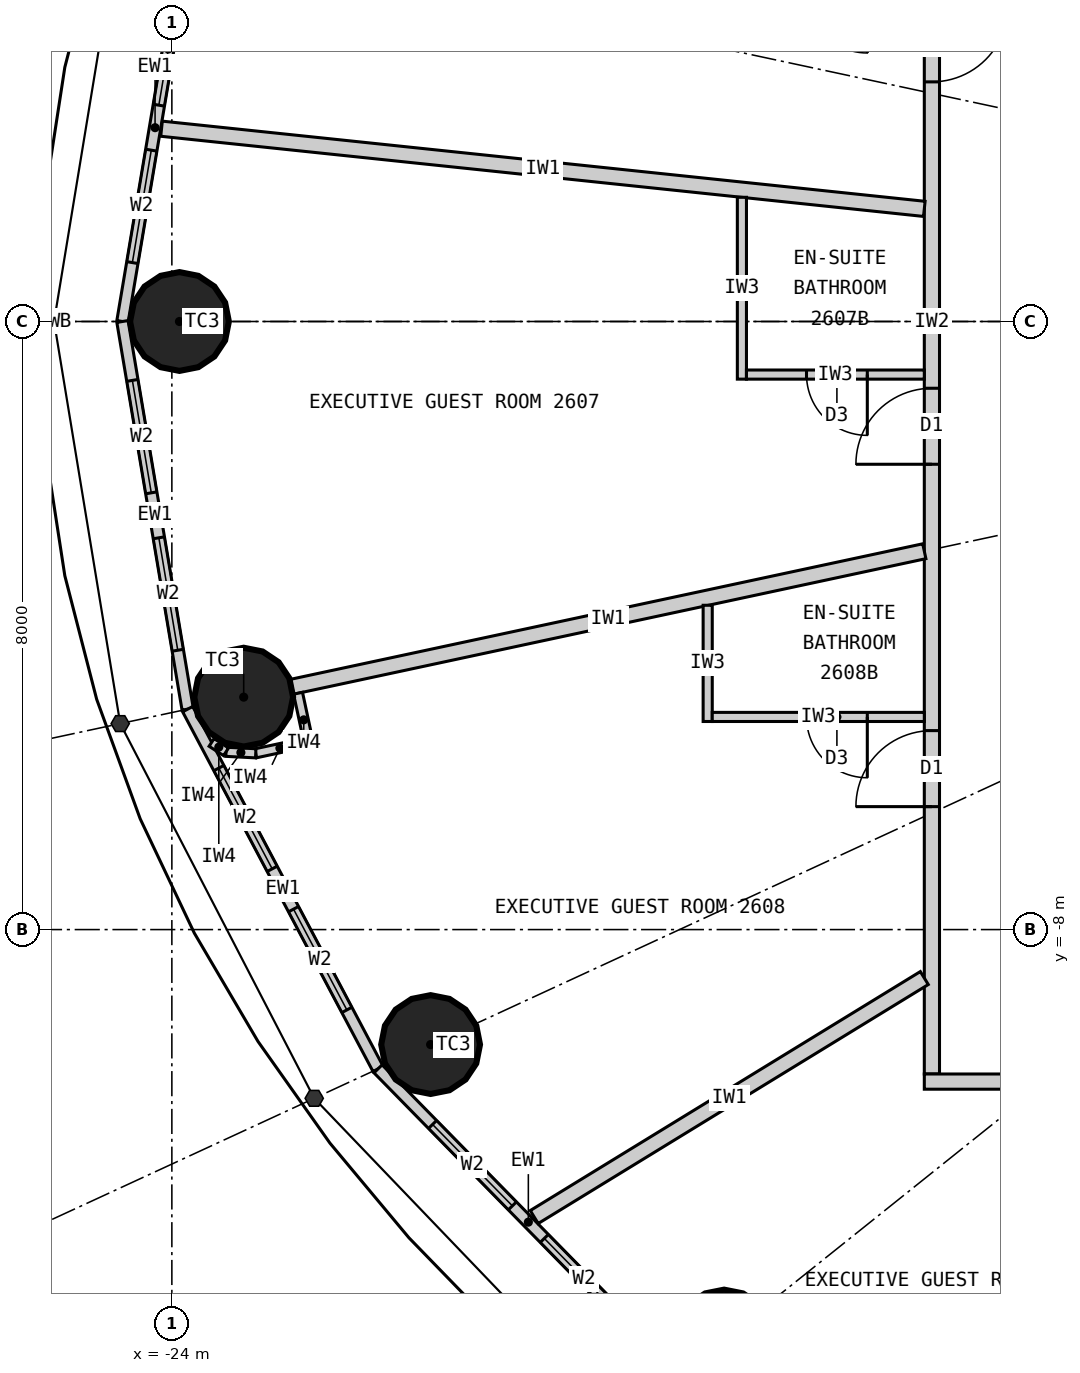
"""IFC4 building model, lengths in metres.
Left out: names, types, materials, properties, quantities, classifications, styles, units other than length and angle.
Written with IfcOpenShell. Run it as: python <this file> out.ifc"""

import sys

from ifc_helpers import new_model, si_unit, direction, frame, frame_2d, origin, origin_2d, place, context, subcontext, project, spatial, rectangle, circle, extrude, element, fill, save


model = new_model("IFC4")
c1 = context("Model", 3, precision=1e-05, world=origin(), true_north=direction((0.0, 1.0)))
c2 = subcontext(c1, "Body", "Model", "MODEL_VIEW")
j1 = project(units=[si_unit("LENGTHUNIT", "METRE"), si_unit("PLANEANGLEUNIT", "RADIAN")], contexts=[c1])
p1 = place(None, origin())
s1 = spatial("IfcSite", under=j1, at=p1, CompositionType="ELEMENT")
p2 = place(p1, origin())
s2 = spatial("IfcBuilding", under=s1, at=p2, CompositionType="ELEMENT")
p3 = place(p2, frame((0.0, 0.0, 105.6)))
s3 = spatial("IfcBuildingStorey", under=s2, at=p3, CompositionType="ELEMENT", Elevation=105.6)
for number, where, z_axis, x_axis in (
    (1, (-23.9, 0.0, 0.0), (0.0, 0.0, 1.0), (1.0, 0.0, 0.0)),
    (2, (-23.055, -4.942, 0.0), (0.0, 0.0, 1.0), (1.0, 0.0, 0.0)),
    (3, (-20.596, -9.513, 0.0), (0.0, 0.0, 1.0), (1.0, 0.0, 0.0)),
    (4, (-16.734, -13.387, 0.0), (0.0, 0.0, 1.0), (1.0, 0.0, 0.0)),
):
    element("IfcColumn", number, at=place(p3, frame(where, z_axis=z_axis, x_axis=x_axis)), inside=s3, PredefinedType="COLUMN", context=c2, shape_type="SweptSolid", body=[
        extrude(circle(Radius=0.65, at=origin_2d()), origin(), (0.0, 0.0, 1.0), 3.3),
    ])
p4 = place(p3, frame((-23.792, 5.1, 0.0), z_axis=(0.0, 0.0, 1.0), x_axis=(-0.165883894218, -0.986145290329, 0.0)))
e5 = element("IfcWall", 5, at=p4, inside=s3, PredefinedType="ELEMENTEDWALL", context=c2, shape_type="SweptSolid", body=[
    extrude(rectangle(XDim=5.172, YDim=0.15, at=frame_2d((2.586, 0.0))), origin(), (0.0, 0.0, 1.0), 3.12),
])
p5 = place(p4, frame((0.786, 0.0, 0.9)))
e6 = element("IfcOpeningElement", 6, at=p5, cuts=e5, PredefinedType="OPENING", context=c2, shape_type="SweptSolid", body=[
    extrude(rectangle(XDim=1.5, YDim=1.9, at=frame_2d((0.75, 0.95))), frame((0.0, 0.085, 0.0), z_axis=(0.0, -1.0, 0.0), x_axis=(1.0, 0.0, 0.0)), (0.0, 0.0, 1.0), 0.17),
])
p6 = place(p4, frame((2.886, 0.0, 0.9)))
e7 = element("IfcOpeningElement", 7, at=p6, cuts=e5, PredefinedType="OPENING", context=c2, shape_type="SweptSolid", body=[
    extrude(rectangle(XDim=1.5, YDim=1.9, at=frame_2d((0.75, 0.95))), frame((0.0, 0.085, 0.0), z_axis=(0.0, -1.0, 0.0), x_axis=(1.0, 0.0, 0.0)), (0.0, 0.0, 1.0), 0.17),
])
p7 = place(p3, frame((-24.65, 0.0, 0.0), z_axis=(0.0, 0.0, 1.0), x_axis=(0.165883894218, -0.986145290329, 0.0)))
e8 = element("IfcWall", 8, at=p7, inside=s3, PredefinedType="ELEMENTEDWALL", context=c2, shape_type="SweptSolid", body=[
    extrude(rectangle(XDim=5.172, YDim=0.15, at=frame_2d((2.586, 0.0))), origin(), (0.0, 0.0, 1.0), 3.12),
])
p8 = place(p7, frame((0.786, 0.0, 0.9)))
e9 = element("IfcOpeningElement", 9, at=p8, cuts=e8, PredefinedType="OPENING", context=c2, shape_type="SweptSolid", body=[
    extrude(rectangle(XDim=1.5, YDim=1.9, at=frame_2d((0.75, 0.95))), frame((0.0, 0.085, 0.0), z_axis=(0.0, -1.0, 0.0), x_axis=(1.0, 0.0, 0.0)), (0.0, 0.0, 1.0), 0.17),
])
p9 = place(p7, frame((2.886, 0.0, 0.9)))
e10 = element("IfcOpeningElement", 10, at=p9, cuts=e8, PredefinedType="OPENING", context=c2, shape_type="SweptSolid", body=[
    extrude(rectangle(XDim=1.5, YDim=1.9, at=frame_2d((0.75, 0.95))), frame((0.0, 0.085, 0.0), z_axis=(0.0, -1.0, 0.0), x_axis=(1.0, 0.0, 0.0)), (0.0, 0.0, 1.0), 0.17),
])
p10 = place(p3, frame((-23.792, -5.1, 0.0), z_axis=(0.0, 0.0, 1.0), x_axis=(0.467814388454, -0.883826735257, 0.0)))
e11 = element("IfcWall", 11, at=p10, inside=s3, PredefinedType="ELEMENTEDWALL", context=c2, shape_type="SweptSolid", body=[
    extrude(rectangle(XDim=5.354, YDim=0.15, at=frame_2d((2.677, 0.0))), origin(), (0.0, 0.0, 1.0), 3.12),
])
p11 = place(p10, frame((0.877, 0.0, 0.9)))
e12 = element("IfcOpeningElement", 12, at=p11, cuts=e11, PredefinedType="OPENING", context=c2, shape_type="SweptSolid", body=[
    extrude(rectangle(XDim=1.5, YDim=1.9, at=frame_2d((0.75, 0.95))), frame((0.0, 0.085, 0.0), z_axis=(0.0, -1.0, 0.0), x_axis=(1.0, 0.0, 0.0)), (0.0, 0.0, 1.0), 0.17),
])
p12 = place(p10, frame((2.977, 0.0, 0.9)))
e13 = element("IfcOpeningElement", 13, at=p12, cuts=e11, PredefinedType="OPENING", context=c2, shape_type="SweptSolid", body=[
    extrude(rectangle(XDim=1.5, YDim=1.9, at=frame_2d((0.75, 0.95))), frame((0.0, 0.085, 0.0), z_axis=(0.0, -1.0, 0.0), x_axis=(1.0, 0.0, 0.0)), (0.0, 0.0, 1.0), 0.17),
])
p13 = place(p3, frame((-21.287, -9.832, 0.0), z_axis=(0.0, 0.0, 1.0), x_axis=(0.700136650834, -0.714008872605, 0.0)))
e14 = element("IfcWall", 14, at=p13, inside=s3, PredefinedType="ELEMENTEDWALL", context=c2, shape_type="SweptSolid", body=[
    extrude(rectangle(XDim=5.649, YDim=0.15, at=frame_2d((2.825, 0.0))), origin(), (0.0, 0.0, 1.0), 3.12),
])
p14 = place(p13, frame((1.025, 0.0, 0.9)))
e15 = element("IfcOpeningElement", 15, at=p14, cuts=e14, PredefinedType="OPENING", context=c2, shape_type="SweptSolid", body=[
    extrude(rectangle(XDim=1.5, YDim=1.9, at=frame_2d((0.75, 0.95))), frame((0.0, 0.085, 0.0), z_axis=(0.0, -1.0, 0.0), x_axis=(1.0, 0.0, 0.0)), (0.0, 0.0, 1.0), 0.17),
])
p15 = place(p13, frame((3.125, 0.0, 0.9)))
e16 = element("IfcOpeningElement", 16, at=p15, cuts=e14, PredefinedType="OPENING", context=c2, shape_type="SweptSolid", body=[
    extrude(rectangle(XDim=1.5, YDim=1.9, at=frame_2d((0.75, 0.95))), frame((0.0, 0.085, 0.0), z_axis=(0.0, -1.0, 0.0), x_axis=(1.0, 0.0, 0.0)), (0.0, 0.0, 1.0), 0.17),
])
p16 = place(p3, frame((-14.0, 9.9, 0.0), z_axis=(0.0, 0.0, 1.0), x_axis=(0.0, -1.0, 0.0)))
e17 = element("IfcWall", 17, at=p16, inside=s3, PredefinedType="PARTITIONING", context=c2, shape_type="SweptSolid", body=[
    extrude(rectangle(XDim=19.8, YDim=0.2, at=frame_2d((9.9, 0.0))), origin(), (0.0, 0.0, 1.0), 3.12),
])
p17 = place(p16, frame((5.748, 0.0, 0.0)))
e18 = element("IfcOpeningElement", 18, at=p17, cuts=e17, PredefinedType="OPENING", context=c2, shape_type="SweptSolid", body=[
    extrude(rectangle(XDim=1.0, YDim=2.2, at=frame_2d((0.5, 1.1))), frame((0.0, 0.11, 0.0), z_axis=(0.0, -1.0, 0.0), x_axis=(1.0, 0.0, 0.0)), (0.0, 0.0, 1.0), 0.22),
])
p18 = place(p16, frame((10.778, 0.0, 0.0)))
e19 = element("IfcOpeningElement", 19, at=p18, cuts=e17, PredefinedType="OPENING", context=c2, shape_type="SweptSolid", body=[
    extrude(rectangle(XDim=1.0, YDim=2.2, at=frame_2d((0.5, 1.1))), frame((0.0, 0.11, 0.0), z_axis=(0.0, -1.0, 0.0), x_axis=(1.0, 0.0, 0.0)), (0.0, 0.0, 1.0), 0.22),
])
p19 = place(p16, frame((15.282, 0.0, 0.0)))
e20 = element("IfcOpeningElement", 20, at=p19, cuts=e17, PredefinedType="OPENING", context=c2, shape_type="SweptSolid", body=[
    extrude(rectangle(XDim=1.0, YDim=2.2, at=frame_2d((0.5, 1.1))), frame((0.0, 0.11, 0.0), z_axis=(0.0, -1.0, 0.0), x_axis=(1.0, 0.0, 0.0)), (0.0, 0.0, 1.0), 0.22),
])
p20 = place(p3, frame((-3.283, -10.0, 0.0), z_axis=(0.0, 0.0, 1.0), x_axis=(-1.0, 0.0, 0.0)))
e21 = element("IfcWall", 21, at=p20, inside=s3, PredefinedType="PARTITIONING", context=c2, shape_type="SweptSolid", body=[
    extrude(rectangle(XDim=10.817, YDim=0.2, at=frame_2d((5.409, 0.0))), origin(), (0.0, 0.0, 1.0), 3.12),
])
p21 = place(p20, frame((7.03, 0.0, 0.0)))
e22 = element("IfcOpeningElement", 22, at=p21, cuts=e21, PredefinedType="OPENING", context=c2, shape_type="SweptSolid", body=[
    extrude(rectangle(XDim=1.0, YDim=2.2, at=frame_2d((0.5, 1.1))), frame((0.0, 0.11, 0.0), z_axis=(0.0, -1.0, 0.0), x_axis=(1.0, 0.0, 0.0)), (0.0, 0.0, 1.0), 0.22),
])
p22 = place(p3, frame((-14.1, 1.482, 0.0), z_axis=(0.0, 0.0, 1.0), x_axis=(-0.994523202615, 0.104516024894, 0.0)))
e23 = element("IfcWall", 23, at=p22, inside=s3, PredefinedType="PARTITIONING", context=c2, shape_type="SweptSolid", body=[
    extrude(rectangle(XDim=10.091, YDim=0.2, at=frame_2d((5.045, 0.0))), origin(), (0.0, 0.0, 1.0), 2.37),
])
p23 = place(p3, frame((-14.1, -3.022, 0.0), z_axis=(0.0, 0.0, 1.0), x_axis=(-0.977783513367, -0.209617272638, 0.0)))
e24 = element("IfcWall", 24, at=p23, inside=s3, PredefinedType="PARTITIONING", context=c2, shape_type="SweptSolid", body=[
    extrude(rectangle(XDim=8.508, YDim=0.2, at=frame_2d((4.254, 0.0))), origin(), (0.0, 0.0, 1.0), 2.27),
])
p24 = place(p3, frame((-14.1, -8.638, 0.0), z_axis=(0.0, 0.0, 1.0), x_axis=(-0.852706758009, -0.5223898782, 0.0)))
e25 = element("IfcWall", 25, at=p24, inside=s3, PredefinedType="PARTITIONING", context=c2, shape_type="SweptSolid", body=[
    extrude(rectangle(XDim=6.019, YDim=0.2, at=frame_2d((3.009, 0.0))), origin(), (0.0, 0.0, 1.0), 3.12),
])
p25 = place(p3, frame((-16.5, 1.634, 0.0), z_axis=(0.0, 0.0, 1.0), x_axis=(0.0, -1.0, 0.0)))
e26 = element("IfcWall", 26, at=p25, inside=s3, PredefinedType="PARTITIONING", context=c2, shape_type="SweptSolid", body=[
    extrude(rectangle(XDim=2.392, YDim=0.12, at=frame_2d((1.196, 0.0))), origin(), (0.0, 0.0, 1.0), 3.12),
])
p26 = place(p3, frame((-14.1, -0.698, 0.0), z_axis=(0.0, 0.0, 1.0), x_axis=(-1.0, 0.0, 0.0)))
e27 = element("IfcWall", 27, at=p26, inside=s3, PredefinedType="PARTITIONING", context=c2, shape_type="SweptSolid", body=[
    extrude(rectangle(XDim=2.34, YDim=0.12, at=frame_2d((1.17, 0.0))), origin(), (0.0, 0.0, 1.0), 3.12),
])
p27 = place(p26, frame((0.75, 0.0, 0.0)))
e28 = element("IfcOpeningElement", 28, at=p27, cuts=e27, PredefinedType="OPENING", context=c2, shape_type="SweptSolid", body=[
    extrude(rectangle(XDim=0.8, YDim=2.1, at=frame_2d((0.4, 1.05))), frame((0.0, 0.07, 0.0), z_axis=(0.0, -1.0, 0.0), x_axis=(1.0, 0.0, 0.0)), (0.0, 0.0, 1.0), 0.14),
])
p28 = place(p3, frame((-16.95, -3.733, 0.0), z_axis=(0.0, 0.0, 1.0), x_axis=(0.0, -1.0, 0.0)))
e29 = element("IfcWall", 29, at=p28, inside=s3, PredefinedType="PARTITIONING", context=c2, shape_type="SweptSolid", body=[
    extrude(rectangle(XDim=1.529, YDim=0.12, at=frame_2d((0.765, 0.0))), origin(), (0.0, 0.0, 1.0), 3.12),
])
p29 = place(p3, frame((-14.1, -5.202, 0.0), z_axis=(0.0, 0.0, 1.0), x_axis=(-1.0, 0.0, 0.0)))
e30 = element("IfcWall", 30, at=p29, inside=s3, PredefinedType="PARTITIONING", context=c2, shape_type="SweptSolid", body=[
    extrude(rectangle(XDim=2.79, YDim=0.12, at=frame_2d((1.395, 0.0))), origin(), (0.0, 0.0, 1.0), 3.12),
])
p30 = place(p29, frame((0.75, 0.0, 0.0)))
e31 = element("IfcOpeningElement", 31, at=p30, cuts=e30, PredefinedType="OPENING", context=c2, shape_type="SweptSolid", body=[
    extrude(rectangle(XDim=0.8, YDim=2.1, at=frame_2d((0.4, 1.05))), frame((0.0, 0.07, 0.0), z_axis=(0.0, -1.0, 0.0), x_axis=(1.0, 0.0, 0.0)), (0.0, 0.0, 1.0), 0.14),
])
p31 = place(p3, frame((-22.34, -4.891, 0.0), z_axis=(0.0, 0.0, 1.0), x_axis=(0.20948248875, -0.977812398626, 0.0)))
e32 = element("IfcWall", 32, at=p31, inside=s3, PredefinedType="PARTITIONING", context=c2, shape_type="SweptSolid", body=[
    extrude(rectangle(XDim=0.716, YDim=0.12, at=frame_2d((0.358, 0.0))), origin(), (0.0, 0.0, 1.0), 3.12),
])
p32 = place(p3, frame((-22.261, -5.545, 0.0), z_axis=(0.0, 0.0, 1.0), x_axis=(-0.977785919621, -0.209606048079, 0.0)))
e33 = element("IfcWall", 33, at=p32, inside=s3, PredefinedType="PARTITIONING", context=c2, shape_type="SweptSolid", body=[
    extrude(rectangle(XDim=0.65, YDim=0.12, at=frame_2d((0.325, 0.0))), origin(), (0.0, 0.0, 1.0), 3.12),
])
p33 = place(p3, frame((-22.896, -5.681, 0.0), z_axis=(0.0, 0.0, 1.0), x_axis=(-0.998721012592, 0.050560251262, 0.0)))
e34 = element("IfcWall", 34, at=p33, inside=s3, PredefinedType="PARTITIONING", context=c2, shape_type="SweptSolid", body=[
    extrude(rectangle(XDim=0.391, YDim=0.12, at=frame_2d((0.196, 0.0))), origin(), (0.0, 0.0, 1.0), 3.12),
])
p34 = place(p3, frame((-23.287, -5.661, 0.0), z_axis=(0.0, 0.0, 1.0), x_axis=(-0.839916668497, 0.542715385798, 0.0)))
e35 = element("IfcWall", 35, at=p34, inside=s3, PredefinedType="PARTITIONING", context=c2, shape_type="SweptSolid", body=[
    extrude(rectangle(XDim=0.227, YDim=0.12, at=frame_2d((0.113, 0.0))), origin(), (0.0, 0.0, 1.0), 3.12),
])
p35 = place(p5, origin())
e36 = element("IfcWindow", 36, at=p35, inside=s3, PartitioningType="SINGLE_PANEL", PredefinedType="WINDOW", context=c2, shape_type="SweptSolid", body=[
    extrude(rectangle(XDim=1.5, YDim=1.9, at=frame_2d((0.75, 0.95))), frame((0.0, 0.03, 0.0), z_axis=(0.0, -1.0, 0.0), x_axis=(1.0, 0.0, 0.0)), (0.0, 0.0, 1.0), 0.06),
])
fill(e6, e36)
p36 = place(p6, origin())
e37 = element("IfcWindow", 37, at=p36, inside=s3, PartitioningType="SINGLE_PANEL", PredefinedType="WINDOW", context=c2, shape_type="SweptSolid", body=[
    extrude(rectangle(XDim=1.5, YDim=1.9, at=frame_2d((0.75, 0.95))), frame((0.0, 0.03, 0.0), z_axis=(0.0, -1.0, 0.0), x_axis=(1.0, 0.0, 0.0)), (0.0, 0.0, 1.0), 0.06),
])
fill(e7, e37)
p37 = place(p8, origin())
e38 = element("IfcWindow", 38, at=p37, inside=s3, PartitioningType="SINGLE_PANEL", PredefinedType="WINDOW", context=c2, shape_type="SweptSolid", body=[
    extrude(rectangle(XDim=1.5, YDim=1.9, at=frame_2d((0.75, 0.95))), frame((0.0, 0.03, 0.0), z_axis=(0.0, -1.0, 0.0), x_axis=(1.0, 0.0, 0.0)), (0.0, 0.0, 1.0), 0.06),
])
fill(e9, e38)
p38 = place(p9, origin())
e39 = element("IfcWindow", 39, at=p38, inside=s3, PartitioningType="SINGLE_PANEL", PredefinedType="WINDOW", context=c2, shape_type="SweptSolid", body=[
    extrude(rectangle(XDim=1.5, YDim=1.9, at=frame_2d((0.75, 0.95))), frame((0.0, 0.03, 0.0), z_axis=(0.0, -1.0, 0.0), x_axis=(1.0, 0.0, 0.0)), (0.0, 0.0, 1.0), 0.06),
])
fill(e10, e39)
p39 = place(p11, origin())
e40 = element("IfcWindow", 40, at=p39, inside=s3, PartitioningType="SINGLE_PANEL", PredefinedType="WINDOW", context=c2, shape_type="SweptSolid", body=[
    extrude(rectangle(XDim=1.5, YDim=1.9, at=frame_2d((0.75, 0.95))), frame((0.0, 0.03, 0.0), z_axis=(0.0, -1.0, 0.0), x_axis=(1.0, 0.0, 0.0)), (0.0, 0.0, 1.0), 0.06),
])
fill(e12, e40)
p40 = place(p12, origin())
e41 = element("IfcWindow", 41, at=p40, inside=s3, PartitioningType="SINGLE_PANEL", PredefinedType="WINDOW", context=c2, shape_type="SweptSolid", body=[
    extrude(rectangle(XDim=1.5, YDim=1.9, at=frame_2d((0.75, 0.95))), frame((0.0, 0.03, 0.0), z_axis=(0.0, -1.0, 0.0), x_axis=(1.0, 0.0, 0.0)), (0.0, 0.0, 1.0), 0.06),
])
fill(e13, e41)
p41 = place(p14, origin())
e42 = element("IfcWindow", 42, at=p41, inside=s3, PartitioningType="SINGLE_PANEL", PredefinedType="WINDOW", context=c2, shape_type="SweptSolid", body=[
    extrude(rectangle(XDim=1.5, YDim=1.9, at=frame_2d((0.75, 0.95))), frame((0.0, 0.03, 0.0), z_axis=(0.0, -1.0, 0.0), x_axis=(1.0, 0.0, 0.0)), (0.0, 0.0, 1.0), 0.06),
])
fill(e15, e42)
p42 = place(p15, origin())
e43 = element("IfcWindow", 43, at=p42, inside=s3, PartitioningType="SINGLE_PANEL", PredefinedType="WINDOW", context=c2, shape_type="SweptSolid", body=[
    extrude(rectangle(XDim=1.5, YDim=1.9, at=frame_2d((0.75, 0.95))), frame((0.0, 0.03, 0.0), z_axis=(0.0, -1.0, 0.0), x_axis=(1.0, 0.0, 0.0)), (0.0, 0.0, 1.0), 0.06),
])
fill(e16, e43)
p43 = place(p17, origin())
e44 = element("IfcDoor", 44, at=p43, inside=s3, OperationType="SINGLE_SWING_LEFT", PredefinedType="DOOR", context=c2, shape_type="SweptSolid", body=[
    extrude(rectangle(XDim=1.0, YDim=2.2, at=frame_2d((0.5, 1.1))), frame((0.0, 0.025, 0.0), z_axis=(0.0, -1.0, 0.0), x_axis=(1.0, 0.0, 0.0)), (0.0, 0.0, 1.0), 0.05),
])
fill(e18, e44)
p44 = place(p27, origin())
e45 = element("IfcDoor", 45, at=p44, inside=s3, OperationType="SINGLE_SWING_LEFT", PredefinedType="DOOR", context=c2, shape_type="SweptSolid", body=[
    extrude(rectangle(XDim=0.8, YDim=2.1, at=frame_2d((0.4, 1.05))), frame((0.0, 0.025, 0.0), z_axis=(0.0, -1.0, 0.0), x_axis=(1.0, 0.0, 0.0)), (0.0, 0.0, 1.0), 0.05),
])
fill(e28, e45)
p45 = place(p18, origin())
e46 = element("IfcDoor", 46, at=p45, inside=s3, OperationType="SINGLE_SWING_RIGHT", PredefinedType="DOOR", context=c2, shape_type="SweptSolid", body=[
    extrude(rectangle(XDim=1.0, YDim=2.2, at=frame_2d((0.5, 1.1))), frame((0.0, 0.025, 0.0), z_axis=(0.0, -1.0, 0.0), x_axis=(1.0, 0.0, 0.0)), (0.0, 0.0, 1.0), 0.05),
])
fill(e19, e46)
p46 = place(p30, origin())
e47 = element("IfcDoor", 47, at=p46, inside=s3, OperationType="SINGLE_SWING_LEFT", PredefinedType="DOOR", context=c2, shape_type="SweptSolid", body=[
    extrude(rectangle(XDim=0.8, YDim=2.1, at=frame_2d((0.4, 1.05))), frame((0.0, 0.025, 0.0), z_axis=(0.0, -1.0, 0.0), x_axis=(1.0, 0.0, 0.0)), (0.0, 0.0, 1.0), 0.05),
])
fill(e31, e47)
p47 = place(p19, origin())
e48 = element("IfcDoor", 48, at=p47, inside=s3, OperationType="SINGLE_SWING_RIGHT", PredefinedType="DOOR", context=c2, shape_type="SweptSolid", body=[
    extrude(rectangle(XDim=1.0, YDim=2.2, at=frame_2d((0.5, 1.1))), frame((0.0, 0.025, 0.0), z_axis=(0.0, -1.0, 0.0), x_axis=(1.0, 0.0, 0.0)), (0.0, 0.0, 1.0), 0.05),
])
fill(e20, e48)
save(model, sys.argv[1])
